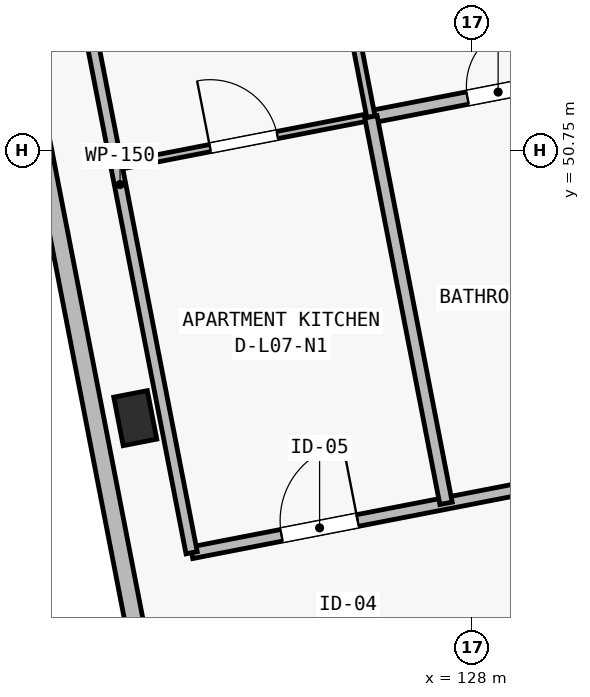
"""IFC4 building model, lengths in metres.
Left out: names, types, materials, properties, quantities, classifications, styles, units other than length and angle.
Written with IfcOpenShell. Run it as: python <this file> out.ifc"""

import sys

from ifc_helpers import new_model, si_unit, direction, frame, frame_2d, origin, origin_2d, place, context, subcontext, project, spatial, rectangle, extrude, element, fill, save


model = new_model("IFC4")
c1 = context("Model", 3, precision=1e-05, world=origin(), true_north=direction((0.0, 1.0)))
c2 = subcontext(c1, "Body", "Model", "MODEL_VIEW")
j1 = project(units=[si_unit("LENGTHUNIT", "METRE"), si_unit("PLANEANGLEUNIT", "RADIAN")], contexts=[c1])
p1 = place(None, origin())
s1 = spatial("IfcSite", under=j1, at=p1, CompositionType="ELEMENT")
p2 = place(p1, origin())
s2 = spatial("IfcBuilding", under=s1, at=p2, CompositionType="ELEMENT")
p3 = place(p2, frame((0.0, 0.0, 24.65)))
s3 = spatial("IfcBuildingStorey", under=s2, at=p3, CompositionType="ELEMENT", Elevation=24.65)
p4 = place(p3, frame((123.571, 47.23, 0.0), z_axis=(0.0, 0.0, 1.0), x_axis=(0.981627183448, 0.190808995377, 0.0)))
e1 = element("IfcColumn", 1, at=p4, inside=s3, PredefinedType="COLUMN", context=c2, shape_type="SweptSolid", body=[
    extrude(rectangle(XDim=0.45, YDim=0.65, at=origin_2d()), origin(), (0.0, 0.0, 1.0), 3.25),
])
p5 = place(p3, frame((125.445, 34.835, 0.0), z_axis=(0.0, 0.0, 1.0), x_axis=(-0.190808900739, 0.981627201843, 0.0)))
e2 = element("IfcWall", 2, at=p5, inside=s3, PredefinedType="SOLIDWALL", context=c2, shape_type="SweptSolid", body=[
    extrude(rectangle(XDim=20.65, YDim=0.24, at=frame_2d((10.325, 0.0))), origin(), (0.0, 0.0, 1.0), 3.409),
])
p6 = place(p5, frame((2.99, 0.0, 0.52)))
e3 = element("IfcOpeningElement", 3, at=p6, cuts=e2, PredefinedType="OPENING", context=c2, shape_type="SweptSolid", body=[
    extrude(rectangle(XDim=0.62, YDim=2.28, at=frame_2d((0.31, 1.14))), frame((0.0, 0.135, 0.0), z_axis=(0.0, -1.0, 0.0), x_axis=(1.0, 0.0, 0.0)), (0.0, 0.0, 1.0), 0.27),
])
p7 = place(p5, frame((17.26, 0.0, 0.45)))
e4 = element("IfcOpeningElement", 4, at=p7, cuts=e2, PredefinedType="OPENING", context=c2, shape_type="SweptSolid", body=[
    extrude(rectangle(XDim=0.76, YDim=2.34, at=frame_2d((0.38, 1.17))), frame((0.0, 0.135, 0.0), z_axis=(0.0, -1.0, 0.0), x_axis=(1.0, 0.0, 0.0)), (0.0, 0.0, 1.0), 0.27),
])
p8 = place(p3, frame((123.942, 43.247, 0.0), z_axis=(0.0, 0.0, 1.0), x_axis=(0.981626358594, 0.190813238834, 0.0)))
e5 = element("IfcWall", 5, at=p8, inside=s3, PredefinedType="PARTITIONING", context=c2, shape_type="SweptSolid", body=[
    extrude(rectangle(XDim=7.76, YDim=0.155, at=frame_2d((3.88, 0.0))), origin(), (0.0, 0.0, 1.0), 3.15),
])
p9 = place(p8, frame((1.985, 0.0, 0.0)))
e6 = element("IfcOpeningElement", 6, at=p9, cuts=e5, PredefinedType="OPENING", context=c2, shape_type="SweptSolid", body=[
    extrude(rectangle(XDim=0.98, YDim=2.15, at=frame_2d((0.49, 1.075))), frame((0.0, 0.093, 0.0), z_axis=(0.0, -1.0, 0.0), x_axis=(1.0, 0.0, 0.0)), (0.0, 0.0, 1.0), 0.185),
])
p10 = place(p3, frame((124.312, 45.459, 0.0), z_axis=(0.0, 0.0, 1.0), x_axis=(0.981627870431, 0.190805461121, 0.0)))
e7 = element("IfcWall", 7, at=p10, inside=s3, PredefinedType="PARTITIONING", context=c2, shape_type="SweptSolid", body=[
    extrude(rectangle(XDim=6.82, YDim=0.155, at=frame_2d((3.41, 0.0))), origin(), (0.0, 0.0, 1.0), 3.15),
])
p11 = place(p10, frame((1.205, 0.0, 0.0)))
e8 = element("IfcOpeningElement", 8, at=p11, cuts=e7, PredefinedType="OPENING", context=c2, shape_type="SweptSolid", body=[
    extrude(rectangle(XDim=1.02, YDim=2.2, at=frame_2d((0.51, 1.1))), frame((0.0, 0.093, 0.0), z_axis=(0.0, -1.0, 0.0), x_axis=(1.0, 0.0, 0.0)), (0.0, 0.0, 1.0), 0.185),
])
p12 = place(p3, frame((123.324, 50.543, 0.0), z_axis=(0.0, 0.0, 1.0), x_axis=(0.981629173664, 0.190798756314, 0.0)))
e9 = element("IfcWall", 9, at=p12, inside=s3, PredefinedType="PARTITIONING", context=c2, shape_type="SweptSolid", body=[
    extrude(rectangle(XDim=3.41, YDim=0.095, at=frame_2d((1.705, 0.0))), origin(), (0.0, 0.0, 1.0), 3.15),
])
p13 = place(p12, frame((1.255, 0.0, 0.0)))
e10 = element("IfcOpeningElement", 10, at=p13, cuts=e9, PredefinedType="OPENING", context=c2, shape_type="SweptSolid", body=[
    extrude(rectangle(XDim=0.9, YDim=2.1, at=frame_2d((0.45, 1.05))), frame((0.0, 0.062, 0.0), z_axis=(0.0, -1.0, 0.0), x_axis=(1.0, 0.0, 0.0)), (0.0, 0.0, 1.0), 0.125),
])
p14 = place(p3, frame((126.671, 51.194, 0.0), z_axis=(0.0, 0.0, 1.0), x_axis=(0.981629173664, 0.190798756314, 0.0)))
e11 = element("IfcWall", 11, at=p14, inside=s3, PredefinedType="PLUMBINGWALL", context=c2, shape_type="SweptSolid", body=[
    extrude(rectangle(XDim=3.41, YDim=0.165, at=frame_2d((1.705, 0.0))), origin(), (0.0, 0.0, 1.0), 3.15),
])
p15 = place(p14, frame((1.295, 0.0, 0.0)))
e12 = element("IfcOpeningElement", 12, at=p15, cuts=e11, PredefinedType="OPENING", context=c2, shape_type="SweptSolid", body=[
    extrude(rectangle(XDim=0.82, YDim=2.08, at=frame_2d((0.41, 1.04))), frame((0.0, 0.097, 0.0), z_axis=(0.0, -1.0, 0.0), x_axis=(1.0, 0.0, 0.0)), (0.0, 0.0, 1.0), 0.195),
])
p16 = place(p3, frame((126.671, 51.194, 0.0), z_axis=(0.0, 0.0, 1.0), x_axis=(-0.190787451574, 0.981631370893, 0.0)))
e13 = element("IfcWall", 13, at=p16, inside=s3, PredefinedType="PARTITIONING", context=c2, shape_type="SweptSolid", body=[
    extrude(rectangle(XDim=4.69, YDim=0.11, at=frame_2d((2.345, 0.0))), origin(), (0.0, 0.0, 1.0), 3.15),
])
p17 = place(p16, frame((1.15, 0.0, 0.0)))
e14 = element("IfcOpeningElement", 14, at=p17, cuts=e13, PredefinedType="OPENING", context=c2, shape_type="SweptSolid", body=[
    extrude(rectangle(XDim=0.9, YDim=2.1, at=frame_2d((0.45, 1.05))), frame((0.0, 0.07, 0.0), z_axis=(0.0, -1.0, 0.0), x_axis=(1.0, 0.0, 0.0)), (0.0, 0.0, 1.0), 0.14),
])
p18 = place(p3, frame((127.66, 46.109, 0.0), z_axis=(0.0, 0.0, 1.0), x_axis=(-0.190838120755, 0.981621521599, 0.0)))
e15 = element("IfcWall", 15, at=p18, inside=s3, PredefinedType="PLUMBINGWALL", context=c2, shape_type="SweptSolid", body=[
    extrude(rectangle(XDim=5.18, YDim=0.165, at=frame_2d((2.59, 0.0))), origin(), (0.0, 0.0, 1.0), 3.15),
])
p19 = place(p3, frame((124.312, 45.459, 0.0), z_axis=(0.0, 0.0, 1.0), x_axis=(-0.190814044018, 0.981626202078, 0.0)))
e16 = element("IfcWall", 16, at=p19, inside=s3, PredefinedType="PARTITIONING", context=c2, shape_type="SweptSolid", body=[
    extrude(rectangle(XDim=9.87, YDim=0.15, at=frame_2d((4.935, 0.0))), origin(), (0.0, 0.0, 1.0), 3.15),
])
p20 = place(p11, origin())
e17 = element("IfcDoor", 17, at=p20, inside=s3, OperationType="SINGLE_SWING_RIGHT", PredefinedType="DOOR", context=c2, shape_type="SweptSolid", body=[
    extrude(rectangle(XDim=1.02, YDim=2.2, at=frame_2d((0.51, 1.1))), frame((0.0, 0.025, 0.0), z_axis=(0.0, -1.0, 0.0), x_axis=(1.0, 0.0, 0.0)), (0.0, 0.0, 1.0), 0.05),
])
fill(e8, e17)
p21 = place(p13, origin())
e18 = element("IfcDoor", 18, at=p21, inside=s3, OperationType="SINGLE_SWING_LEFT", PredefinedType="DOOR", context=c2, shape_type="SweptSolid", body=[
    extrude(rectangle(XDim=0.9, YDim=2.1, at=frame_2d((0.45, 1.05))), frame((0.0, 0.025, 0.0), z_axis=(0.0, -1.0, 0.0), x_axis=(1.0, 0.0, 0.0)), (0.0, 0.0, 1.0), 0.05),
])
fill(e10, e18)
p22 = place(p15, origin())
e19 = element("IfcDoor", 19, at=p22, inside=s3, OperationType="SINGLE_SWING_RIGHT", PredefinedType="DOOR", context=c2, shape_type="SweptSolid", body=[
    extrude(rectangle(XDim=0.82, YDim=2.08, at=frame_2d((0.41, 1.04))), frame((0.0, 0.025, 0.0), z_axis=(0.0, -1.0, 0.0), x_axis=(1.0, 0.0, 0.0)), (0.0, 0.0, 1.0), 0.05),
])
fill(e12, e19)
save(model, sys.argv[1])
